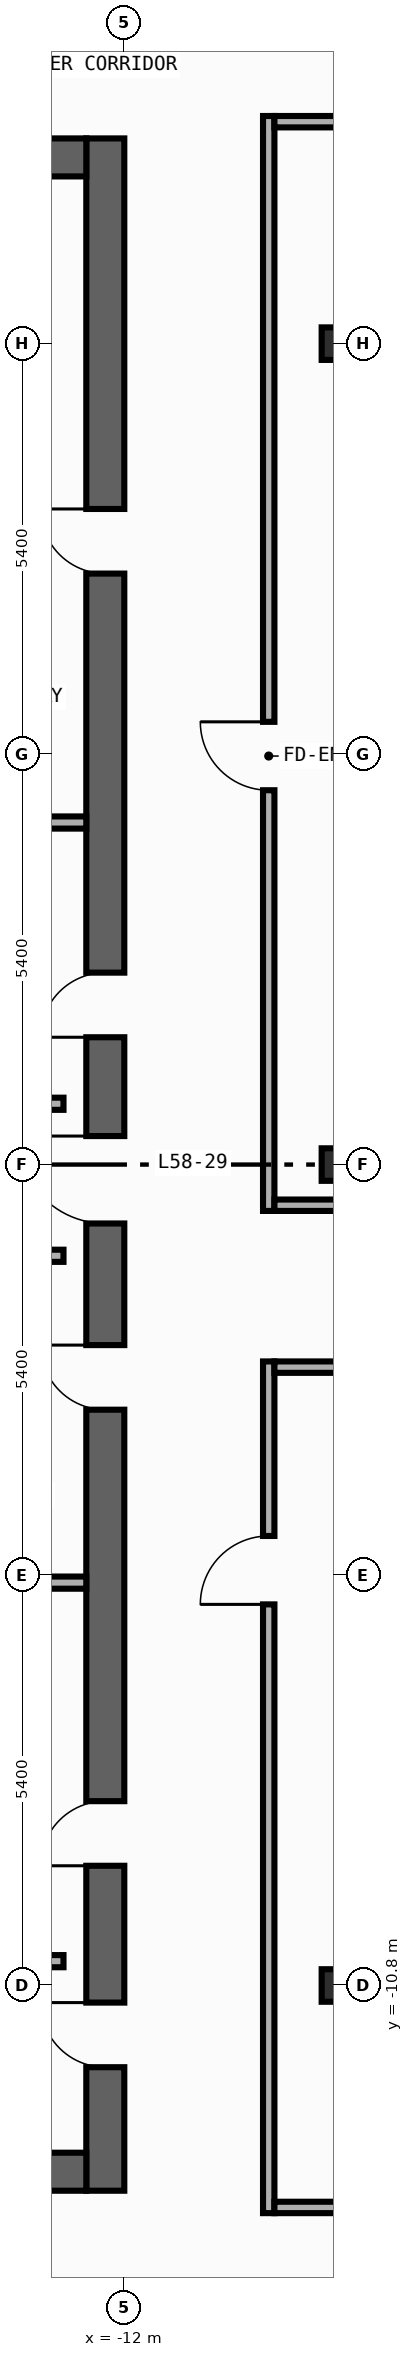
"""IFC4 building model, lengths in metres.
Left out: names, types, materials, properties, quantities, classifications, styles, units other than length and angle.
Written with IfcOpenShell. Run it as: python <this file> out.ifc"""

import sys

from ifc_helpers import new_model, si_unit, direction, frame, frame_2d, origin, origin_2d, place, context, subcontext, project, spatial, rectangle, i_section, extrude, element, fill, save


model = new_model("IFC4")
c1 = context("Model", 3, precision=1e-05, world=origin(), true_north=direction((0.0, 1.0)))
c2 = subcontext(c1, "Body", "Model", "MODEL_VIEW")
j1 = project(units=[si_unit("LENGTHUNIT", "METRE"), si_unit("PLANEANGLEUNIT", "RADIAN")], contexts=[c1])
p1 = place(None, origin())
s1 = spatial("IfcSite", under=j1, at=p1, CompositionType="ELEMENT")
p2 = place(p1, origin())
s2 = spatial("IfcBuilding", under=s1, at=p2, CompositionType="ELEMENT")
p3 = place(p2, frame((0.0, 0.0, 247.6)))
s3 = spatial("IfcBuildingStorey", under=s2, at=p3, CompositionType="ELEMENT", Elevation=247.6)
p4 = place(p3, frame((-12.25, -13.5, 0.0), z_axis=(0.0, 0.0, 1.0), x_axis=(0.0, 1.0, 0.0)))
e1 = element("IfcWall", 1, at=p4, inside=s3, PredefinedType="SHEAR", context=c2, shape_type="SweptSolid", body=[
    extrude(rectangle(XDim=27.0, YDim=0.5, at=frame_2d((13.5, 0.0))), origin(), (0.0, 0.0, 1.0), 3.34),
])
p5 = place(p4, frame((15.175, 0.0, 0.0)))
e2 = element("IfcOpeningElement", 2, at=p5, cuts=e1, PredefinedType="OPENING", context=c2, shape_type="SweptSolid", body=[
    extrude(rectangle(XDim=0.85, YDim=2.1, at=frame_2d((0.425, 1.05))), frame((0.0, 0.26, 0.0), z_axis=(0.0, -1.0, 0.0), x_axis=(1.0, 0.0, 0.0)), (0.0, 0.0, 1.0), 0.52),
])
p6 = place(p4, frame((21.275, 0.0, 0.0)))
e3 = element("IfcOpeningElement", 3, at=p6, cuts=e1, PredefinedType="OPENING", context=c2, shape_type="SweptSolid", body=[
    extrude(rectangle(XDim=0.85, YDim=2.1, at=frame_2d((0.425, 1.05))), frame((0.0, 0.26, 0.0), z_axis=(0.0, -1.0, 0.0), x_axis=(1.0, 0.0, 0.0)), (0.0, 0.0, 1.0), 0.52),
])
p7 = place(p4, frame((4.275, 0.0, 0.0)))
e4 = element("IfcOpeningElement", 4, at=p7, cuts=e1, PredefinedType="OPENING", context=c2, shape_type="SweptSolid", body=[
    extrude(rectangle(XDim=0.85, YDim=2.1, at=frame_2d((0.425, 1.05))), frame((0.0, 0.26, 0.0), z_axis=(0.0, -1.0, 0.0), x_axis=(1.0, 0.0, 0.0)), (0.0, 0.0, 1.0), 0.52),
])
p8 = place(p4, frame((10.275, 0.0, 0.0)))
e5 = element("IfcOpeningElement", 5, at=p8, cuts=e1, PredefinedType="OPENING", context=c2, shape_type="SweptSolid", body=[
    extrude(rectangle(XDim=0.85, YDim=2.1, at=frame_2d((0.425, 1.05))), frame((0.0, 0.26, 0.0), z_axis=(0.0, -1.0, 0.0), x_axis=(1.0, 0.0, 0.0)), (0.0, 0.0, 1.0), 0.52),
])
p9 = place(p4, frame((12.725, 0.0, 0.0)))
e6 = element("IfcOpeningElement", 6, at=p9, cuts=e1, PredefinedType="OPENING", context=c2, shape_type="SweptSolid", body=[
    extrude(rectangle(XDim=1.15, YDim=2.2, at=frame_2d((0.575, 1.1))), frame((0.0, 0.26, 0.0), z_axis=(0.0, -1.0, 0.0), x_axis=(1.0, 0.0, 0.0)), (0.0, 0.0, 1.0), 0.52),
])
p10 = place(p4, frame((1.625, 0.0, 0.0)))
e7 = element("IfcOpeningElement", 7, at=p10, cuts=e1, PredefinedType="OPENING", context=c2, shape_type="SweptSolid", body=[
    extrude(rectangle(XDim=0.85, YDim=2.1, at=frame_2d((0.425, 1.05))), frame((0.0, 0.26, 0.0), z_axis=(0.0, -1.0, 0.0), x_axis=(1.0, 0.0, 0.0)), (0.0, 0.0, 1.0), 0.52),
])
for number, where, z_axis, x_axis in (
    (8, (-19.9, -13.25, 0.0), (0.0, 0.0, 1.0), (1.0, 0.0, 0.0)),
    (9, (-19.9, 13.25, 0.0), (0.0, 0.0, 1.0), (1.0, 0.0, 0.0)),
):
    element("IfcWall", number, at=place(p3, frame(where, z_axis=z_axis, x_axis=x_axis)), inside=s3, PredefinedType="SHEAR", context=c2, shape_type="SweptSolid", body=[
        extrude(rectangle(XDim=7.4, YDim=0.5, at=frame_2d((3.7, 0.0))), origin(), (0.0, 0.0, 1.0), 3.34),
    ])
for number, where, z_axis, x_axis in (
    (10, (-9.2, -10.8, 0.0), (0.0, 0.0, 1.0), (1.0, 0.0, 0.0)),
    (11, (-9.2, 0.0, 0.0), (0.0, 0.0, 1.0), (1.0, 0.0, 0.0)),
    (12, (-9.2, 10.8, 0.0), (0.0, 0.0, 1.0), (1.0, 0.0, 0.0)),
):
    element("IfcColumn", number, at=place(p3, frame(where, z_axis=z_axis, x_axis=x_axis)), inside=s3, PredefinedType="COLUMN", context=c2, shape_type="SweptSolid", body=[
        extrude(i_section(OverallWidth=0.407, OverallDepth=0.428, WebThickness=0.02, FlangeThickness=0.035, FilletRadius=0.022, at=origin_2d()), origin(), (0.0, 0.0, 1.0), 3.6),
    ])
for number, where, z_axis, x_axis in (
    (13, (-15.4, 0.8, 0.0), (0.0, 0.0, 1.0), (1.0, 0.0, 0.0)),
    (14, (-15.4, -1.2, 0.0), (0.0, 0.0, 1.0), (1.0, 0.0, 0.0)),
    (15, (-15.4, -10.48, 0.0), (0.0, 0.0, 1.0), (1.0, 0.0, 0.0)),
):
    element("IfcWall", number, at=place(p3, frame(where, z_axis=z_axis, x_axis=x_axis)), inside=s3, PredefinedType="STANDARD", context=c2, shape_type="SweptSolid", body=[
        extrude(rectangle(XDim=2.6, YDim=0.16, at=frame_2d((1.3, 0.0))), origin(), (0.0, 0.0, 1.0), 3.34),
    ])
for number, where, z_axis, x_axis in (
    (16, (-15.4, 4.5, 0.0), (0.0, 0.0, 1.0), (1.0, 0.0, 0.0)),
    (17, (-15.4, -5.5, 0.0), (0.0, 0.0, 1.0), (1.0, 0.0, 0.0)),
):
    element("IfcWall", number, at=place(p3, frame(where, z_axis=z_axis, x_axis=x_axis)), inside=s3, PredefinedType="PARTITIONING", context=c2, shape_type="SweptSolid", body=[
        extrude(rectangle(XDim=2.9, YDim=0.16, at=frame_2d((1.45, 0.0))), origin(), (0.0, 0.0, 1.0), 3.34),
    ])
p11 = place(p3, frame((-10.1, -0.61, 0.0), z_axis=(0.0, 0.0, 1.0), x_axis=(0.0, 1.0, 0.0)))
e18 = element("IfcWall", 18, at=p11, inside=s3, PredefinedType="PARTITIONING", context=c2, shape_type="SweptSolid", body=[
    extrude(rectangle(XDim=14.405, YDim=0.15, at=frame_2d((7.203, 0.0))), origin(), (0.0, 0.0, 1.0), 3.34),
])
p12 = place(p11, frame((5.535, 0.0, 0.0)))
e19 = element("IfcOpeningElement", 19, at=p12, cuts=e18, PredefinedType="OPENING", context=c2, shape_type="SweptSolid", body=[
    extrude(rectangle(XDim=0.9, YDim=2.15, at=frame_2d((0.45, 1.075))), frame((0.0, 0.085, 0.0), z_axis=(0.0, -1.0, 0.0), x_axis=(1.0, 0.0, 0.0)), (0.0, 0.0, 1.0), 0.17),
])
p13 = place(p3, frame((-10.1, -13.795, 0.0), z_axis=(0.0, 0.0, 1.0), x_axis=(0.0, 1.0, 0.0)))
e20 = element("IfcWall", 20, at=p13, inside=s3, PredefinedType="PARTITIONING", context=c2, shape_type="SweptSolid", body=[
    extrude(rectangle(XDim=11.205, YDim=0.15, at=frame_2d((5.603, 0.0))), origin(), (0.0, 0.0, 1.0), 3.34),
])
p14 = place(p13, frame((8.009, 0.0, 0.0)))
e21 = element("IfcOpeningElement", 21, at=p14, cuts=e20, PredefinedType="OPENING", context=c2, shape_type="SweptSolid", body=[
    extrude(rectangle(XDim=0.9, YDim=2.15, at=frame_2d((0.45, 1.075))), frame((0.0, 0.085, 0.0), z_axis=(0.0, -1.0, 0.0), x_axis=(1.0, 0.0, 0.0)), (0.0, 0.0, 1.0), 0.17),
])
p15 = place(p3, frame((-10.025, -0.535, 0.0), z_axis=(0.0, 0.0, 1.0), x_axis=(1.0, 0.0, 0.0)))
e22 = element("IfcWall", 22, at=p15, inside=s3, PredefinedType="PARTITIONING", context=c2, shape_type="SweptSolid", body=[
    extrude(rectangle(XDim=7.835, YDim=0.15, at=frame_2d((3.917, 0.0))), origin(), (0.0, 0.0, 1.0), 3.34),
])
p16 = place(p15, frame((6.475, 0.0, 0.0)))
e23 = element("IfcOpeningElement", 23, at=p16, cuts=e22, PredefinedType="OPENING", context=c2, shape_type="SweptSolid", body=[
    extrude(rectangle(XDim=0.9, YDim=2.15, at=frame_2d((0.45, 1.075))), frame((0.0, 0.085, 0.0), z_axis=(0.0, -1.0, 0.0), x_axis=(1.0, 0.0, 0.0)), (0.0, 0.0, 1.0), 0.17),
])
p17 = place(p3, frame((-10.025, -2.665, 0.0), z_axis=(0.0, 0.0, 1.0), x_axis=(1.0, 0.0, 0.0)))
e24 = element("IfcWall", 24, at=p17, inside=s3, PredefinedType="PARTITIONING", context=c2, shape_type="SweptSolid", body=[
    extrude(rectangle(XDim=7.855, YDim=0.15, at=frame_2d((3.927, 0.0))), origin(), (0.0, 0.0, 1.0), 3.34),
])
p18 = place(p17, frame((6.495, 0.0, 0.0)))
e25 = element("IfcOpeningElement", 25, at=p18, cuts=e24, PredefinedType="OPENING", context=c2, shape_type="SweptSolid", body=[
    extrude(rectangle(XDim=0.9, YDim=2.15, at=frame_2d((0.45, 1.075))), frame((0.0, 0.085, 0.0), z_axis=(0.0, -1.0, 0.0), x_axis=(1.0, 0.0, 0.0)), (0.0, 0.0, 1.0), 0.17),
])
p19 = place(p3, frame((-10.025, 13.72, 0.0), z_axis=(0.0, 0.0, 1.0), x_axis=(1.0, 0.0, 0.0)))
e26 = element("IfcWall", 26, at=p19, inside=s3, PredefinedType="PARTITIONING", context=c2, shape_type="SweptSolid", body=[
    extrude(rectangle(XDim=7.685, YDim=0.15, at=frame_2d((3.842, 0.0))), origin(), (0.0, 0.0, 1.0), 3.34),
])
p20 = place(p19, frame((6.325, 0.0, 0.0)))
e27 = element("IfcOpeningElement", 27, at=p20, cuts=e26, PredefinedType="OPENING", context=c2, shape_type="SweptSolid", body=[
    extrude(rectangle(XDim=0.9, YDim=2.15, at=frame_2d((0.45, 1.075))), frame((0.0, 0.085, 0.0), z_axis=(0.0, -1.0, 0.0), x_axis=(1.0, 0.0, 0.0)), (0.0, 0.0, 1.0), 0.17),
])
p21 = place(p3, frame((-10.025, -13.72, 0.0), z_axis=(0.0, 0.0, 1.0), x_axis=(1.0, 0.0, 0.0)))
e28 = element("IfcWall", 28, at=p21, inside=s3, PredefinedType="PARTITIONING", context=c2, shape_type="SweptSolid", body=[
    extrude(rectangle(XDim=7.855, YDim=0.15, at=frame_2d((3.927, 0.0))), origin(), (0.0, 0.0, 1.0), 3.34),
])
p22 = place(p21, frame((6.495, 0.0, 0.0)))
e29 = element("IfcOpeningElement", 29, at=p22, cuts=e28, PredefinedType="OPENING", context=c2, shape_type="SweptSolid", body=[
    extrude(rectangle(XDim=0.9, YDim=2.15, at=frame_2d((0.45, 1.075))), frame((0.0, 0.085, 0.0), z_axis=(0.0, -1.0, 0.0), x_axis=(1.0, 0.0, 0.0)), (0.0, 0.0, 1.0), 0.17),
])
p23 = place(p5, origin())
e30 = element("IfcDoor", 30, at=p23, inside=s3, OperationType="SINGLE_SWING_LEFT", PredefinedType="DOOR", context=c2, shape_type="SweptSolid", body=[
    extrude(rectangle(XDim=0.85, YDim=2.1, at=frame_2d((0.425, 1.05))), frame((0.0, 0.025, 0.0), z_axis=(0.0, -1.0, 0.0), x_axis=(1.0, 0.0, 0.0)), (0.0, 0.0, 1.0), 0.05),
])
fill(e2, e30)
p24 = place(p6, origin())
e31 = element("IfcDoor", 31, at=p24, inside=s3, OperationType="SINGLE_SWING_RIGHT", PredefinedType="DOOR", context=c2, shape_type="SweptSolid", body=[
    extrude(rectangle(XDim=0.85, YDim=2.1, at=frame_2d((0.425, 1.05))), frame((0.0, 0.025, 0.0), z_axis=(0.0, -1.0, 0.0), x_axis=(1.0, 0.0, 0.0)), (0.0, 0.0, 1.0), 0.05),
])
fill(e3, e31)
p25 = place(p7, origin())
e32 = element("IfcDoor", 32, at=p25, inside=s3, OperationType="SINGLE_SWING_LEFT", PredefinedType="DOOR", context=c2, shape_type="SweptSolid", body=[
    extrude(rectangle(XDim=0.85, YDim=2.1, at=frame_2d((0.425, 1.05))), frame((0.0, 0.025, 0.0), z_axis=(0.0, -1.0, 0.0), x_axis=(1.0, 0.0, 0.0)), (0.0, 0.0, 1.0), 0.05),
])
fill(e4, e32)
p26 = place(p8, origin())
e33 = element("IfcDoor", 33, at=p26, inside=s3, OperationType="SINGLE_SWING_RIGHT", PredefinedType="DOOR", context=c2, shape_type="SweptSolid", body=[
    extrude(rectangle(XDim=0.85, YDim=2.1, at=frame_2d((0.425, 1.05))), frame((0.0, 0.025, 0.0), z_axis=(0.0, -1.0, 0.0), x_axis=(1.0, 0.0, 0.0)), (0.0, 0.0, 1.0), 0.05),
])
fill(e5, e33)
p27 = place(p9, origin())
e34 = element("IfcDoor", 34, at=p27, inside=s3, OperationType="SINGLE_SWING_RIGHT", PredefinedType="DOOR", context=c2, shape_type="SweptSolid", body=[
    extrude(rectangle(XDim=1.15, YDim=2.2, at=frame_2d((0.575, 1.1))), frame((0.0, 0.025, 0.0), z_axis=(0.0, -1.0, 0.0), x_axis=(1.0, 0.0, 0.0)), (0.0, 0.0, 1.0), 0.05),
])
fill(e6, e34)
p28 = place(p10, origin())
e35 = element("IfcDoor", 35, at=p28, inside=s3, OperationType="SINGLE_SWING_RIGHT", PredefinedType="DOOR", context=c2, shape_type="SweptSolid", body=[
    extrude(rectangle(XDim=0.85, YDim=2.1, at=frame_2d((0.425, 1.05))), frame((0.0, 0.025, 0.0), z_axis=(0.0, -1.0, 0.0), x_axis=(1.0, 0.0, 0.0)), (0.0, 0.0, 1.0), 0.05),
])
fill(e7, e35)
p29 = place(p12, origin())
e36 = element("IfcDoor", 36, at=p29, inside=s3, OperationType="SINGLE_SWING_RIGHT", PredefinedType="DOOR", context=c2, shape_type="SweptSolid", body=[
    extrude(rectangle(XDim=0.9, YDim=2.15, at=frame_2d((0.45, 1.075))), frame((0.0, 0.025, 0.0), z_axis=(0.0, -1.0, 0.0), x_axis=(1.0, 0.0, 0.0)), (0.0, 0.0, 1.0), 0.05),
])
fill(e19, e36)
p30 = place(p14, origin())
e37 = element("IfcDoor", 37, at=p30, inside=s3, OperationType="SINGLE_SWING_LEFT", PredefinedType="DOOR", context=c2, shape_type="SweptSolid", body=[
    extrude(rectangle(XDim=0.9, YDim=2.15, at=frame_2d((0.45, 1.075))), frame((0.0, 0.025, 0.0), z_axis=(0.0, -1.0, 0.0), x_axis=(1.0, 0.0, 0.0)), (0.0, 0.0, 1.0), 0.05),
])
fill(e21, e37)
save(model, sys.argv[1])
